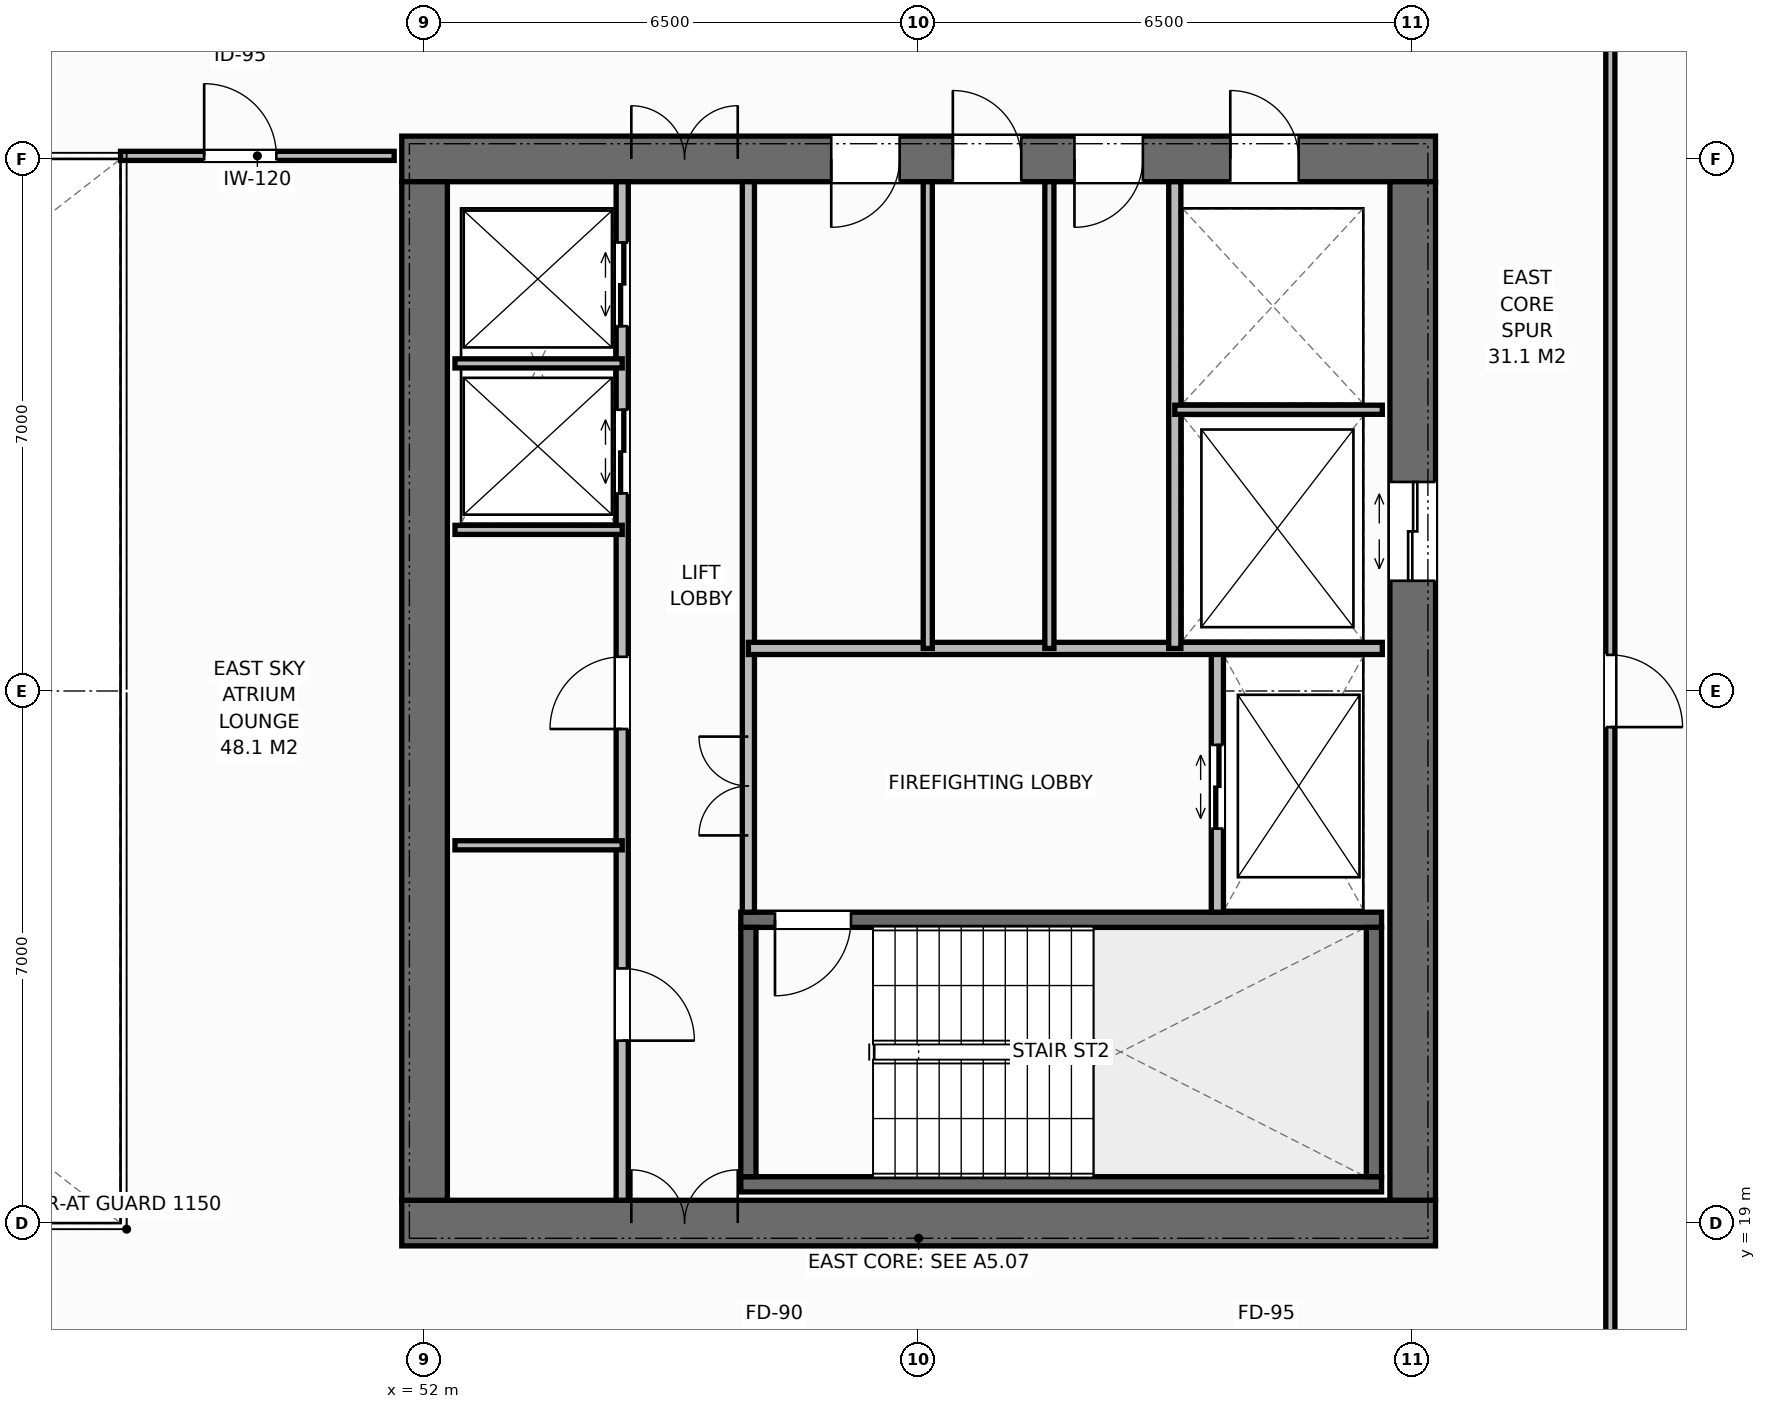
"""IFC4 building model, lengths in metres.
Left out: names, types, materials, properties, quantities, classifications, styles, units other than length and angle.
Written with IfcOpenShell. Run it as: python <this file> out.ifc"""

import sys

from ifc_helpers import new_model, si_unit, direction, frame, frame_2d, origin, place, context, subcontext, project, spatial, rectangle, extrude, element, fill, save


model = new_model("IFC4")
c1 = context("Model", 3, precision=1e-05, world=origin(), true_north=direction((0.0, 1.0)))
c2 = subcontext(c1, "Body", "Model", "MODEL_VIEW")
j1 = project(units=[si_unit("LENGTHUNIT", "METRE"), si_unit("PLANEANGLEUNIT", "RADIAN")], contexts=[c1])
p1 = place(None, origin())
s1 = spatial("IfcSite", under=j1, at=p1, CompositionType="ELEMENT")
p2 = place(p1, origin())
s2 = spatial("IfcBuilding", under=s1, at=p2, CompositionType="ELEMENT")
p3 = place(p2, frame((0.0, 0.0, 178.4)))
s3 = spatial("IfcBuildingStorey", under=s2, at=p3, CompositionType="ELEMENT", Elevation=178.4)
p4 = place(p3, frame((51.7, 19.0, 0.0), z_axis=(0.0, 0.0, 1.0), x_axis=(1.0, 0.0, 0.0)))
e1 = element("IfcWall", 1, at=p4, inside=s3, PredefinedType="SHEAR", context=c2, shape_type="SweptSolid", body=[
    extrude(rectangle(XDim=13.6, YDim=0.6, at=frame_2d((6.8, 0.0))), origin(), (0.0, 0.0, 1.0), 3.8),
])
p5 = place(p4, frame((3.02, 0.0, 0.0)))
e2 = element("IfcOpeningElement", 2, at=p5, cuts=e1, PredefinedType="OPENING", context=c2, shape_type="SweptSolid", body=[
    extrude(rectangle(XDim=1.4, YDim=2.2, at=frame_2d((0.7, 1.1))), frame((0.0, 0.31, 0.0), z_axis=(0.0, -1.0, 0.0), x_axis=(1.0, 0.0, 0.0)), (0.0, 0.0, 1.0), 0.62),
])
p6 = place(p3, frame((51.7, 33.0, 0.0), z_axis=(0.0, 0.0, 1.0), x_axis=(1.0, 0.0, 0.0)))
e3 = element("IfcWall", 3, at=p6, inside=s3, PredefinedType="SHEAR", context=c2, shape_type="SweptSolid", body=[
    extrude(rectangle(XDim=13.6, YDim=0.6, at=frame_2d((6.8, 0.0))), origin(), (0.0, 0.0, 1.0), 3.8),
])
p7 = place(p6, frame((3.02, 0.0, 0.0)))
e4 = element("IfcOpeningElement", 4, at=p7, cuts=e3, PredefinedType="OPENING", context=c2, shape_type="SweptSolid", body=[
    extrude(rectangle(XDim=1.4, YDim=2.2, at=frame_2d((0.7, 1.1))), frame((0.0, 0.31, 0.0), z_axis=(0.0, -1.0, 0.0), x_axis=(1.0, 0.0, 0.0)), (0.0, 0.0, 1.0), 0.62),
])
p8 = place(p6, frame((10.9, 0.0, 0.0)))
e5 = element("IfcOpeningElement", 5, at=p8, cuts=e3, PredefinedType="OPENING", context=c2, shape_type="SweptSolid", body=[
    extrude(rectangle(XDim=0.9, YDim=2.15, at=frame_2d((0.45, 1.075))), frame((0.0, 0.31, 0.0), z_axis=(0.0, -1.0, 0.0), x_axis=(1.0, 0.0, 0.0)), (0.0, 0.0, 1.0), 0.62),
])
p9 = place(p6, frame((5.65, 0.0, 0.0)))
e6 = element("IfcOpeningElement", 6, at=p9, cuts=e3, PredefinedType="OPENING", context=c2, shape_type="SweptSolid", body=[
    extrude(rectangle(XDim=0.9, YDim=2.15, at=frame_2d((0.45, 1.075))), frame((0.0, 0.31, 0.0), z_axis=(0.0, -1.0, 0.0), x_axis=(1.0, 0.0, 0.0)), (0.0, 0.0, 1.0), 0.62),
])
p10 = place(p6, frame((7.25, 0.0, 0.0)))
e7 = element("IfcOpeningElement", 7, at=p10, cuts=e3, PredefinedType="OPENING", context=c2, shape_type="SweptSolid", body=[
    extrude(rectangle(XDim=0.9, YDim=2.15, at=frame_2d((0.45, 1.075))), frame((0.0, 0.31, 0.0), z_axis=(0.0, -1.0, 0.0), x_axis=(1.0, 0.0, 0.0)), (0.0, 0.0, 1.0), 0.62),
])
p11 = place(p6, frame((8.85, 0.0, 0.0)))
e8 = element("IfcOpeningElement", 8, at=p11, cuts=e3, PredefinedType="OPENING", context=c2, shape_type="SweptSolid", body=[
    extrude(rectangle(XDim=0.9, YDim=2.15, at=frame_2d((0.45, 1.075))), frame((0.0, 0.31, 0.0), z_axis=(0.0, -1.0, 0.0), x_axis=(1.0, 0.0, 0.0)), (0.0, 0.0, 1.0), 0.62),
])
p12 = place(p3, frame((52.0, 19.3, 0.0), z_axis=(0.0, 0.0, 1.0), x_axis=(0.0, 1.0, 0.0)))
e9 = element("IfcWall", 9, at=p12, inside=s3, PredefinedType="SHEAR", context=c2, shape_type="SweptSolid", body=[
    extrude(rectangle(XDim=13.4, YDim=0.6, at=frame_2d((6.7, 0.0))), origin(), (0.0, 0.0, 1.0), 3.8),
])
p13 = place(p3, frame((65.0, 19.3, 0.0), z_axis=(0.0, 0.0, 1.0), x_axis=(0.0, 1.0, 0.0)))
e10 = element("IfcWall", 10, at=p13, inside=s3, PredefinedType="SHEAR", context=c2, shape_type="SweptSolid", body=[
    extrude(rectangle(XDim=13.4, YDim=0.6, at=frame_2d((6.7, 0.0))), origin(), (0.0, 0.0, 1.0), 3.8),
])
p14 = place(p13, frame((8.15, 0.0, 0.0)))
e11 = element("IfcOpeningElement", 11, at=p14, cuts=e10, PredefinedType="OPENING", context=c2, shape_type="SweptSolid", body=[
    extrude(rectangle(XDim=1.3, YDim=2.2, at=frame_2d((0.65, 1.1))), frame((0.0, 0.31, 0.0), z_axis=(0.0, -1.0, 0.0), x_axis=(1.0, 0.0, 0.0)), (0.0, 0.0, 1.0), 0.62),
])
p15 = place(p3, frame((56.16, 19.51, 0.0), z_axis=(0.0, 0.0, 1.0), x_axis=(1.0, 0.0, 0.0)))
e12 = element("IfcWall", 12, at=p15, inside=s3, PredefinedType="SHEAR", context=c2, shape_type="SweptSolid", body=[
    extrude(rectangle(XDim=8.43, YDim=0.2, at=frame_2d((4.215, 0.0))), origin(), (0.0, 0.0, 1.0), 3.8),
])
p16 = place(p3, frame((56.16, 22.99, 0.0), z_axis=(0.0, 0.0, 1.0), x_axis=(1.0, 0.0, 0.0)))
e13 = element("IfcWall", 13, at=p16, inside=s3, PredefinedType="SHEAR", context=c2, shape_type="SweptSolid", body=[
    extrude(rectangle(XDim=8.43, YDim=0.2, at=frame_2d((4.215, 0.0))), origin(), (0.0, 0.0, 1.0), 3.8),
])
p17 = place(p16, frame((0.45, 0.0, 0.0)))
e14 = element("IfcOpeningElement", 14, at=p17, cuts=e13, PredefinedType="OPENING", context=c2, shape_type="SweptSolid", body=[
    extrude(rectangle(XDim=1.0, YDim=2.15, at=frame_2d((0.5, 1.075))), frame((0.0, 0.11, 0.0), z_axis=(0.0, -1.0, 0.0), x_axis=(1.0, 0.0, 0.0)), (0.0, 0.0, 1.0), 0.22),
])
for number, where, z_axis, x_axis in (
    (15, (56.26, 19.61, 0.0), (0.0, 0.0, 1.0), (0.0, 1.0, 0.0)),
    (16, (64.49, 19.61, 0.0), (0.0, 0.0, 1.0), (0.0, 1.0, 0.0)),
):
    element("IfcWall", number, at=place(p3, frame(where, z_axis=z_axis, x_axis=x_axis)), inside=s3, PredefinedType="SHEAR", context=c2, shape_type="SweptSolid", body=[
        extrude(rectangle(XDim=3.28, YDim=0.2, at=frame_2d((1.64, 0.0))), origin(), (0.0, 0.0, 1.0), 3.8),
    ])
p18 = place(p3, frame((54.6, 19.3, 0.0), z_axis=(0.0, 0.0, 1.0), x_axis=(0.0, 1.0, 0.0)))
e17 = element("IfcWall", 17, at=p18, inside=s3, PredefinedType="STANDARD", context=c2, shape_type="SweptSolid", body=[
    extrude(rectangle(XDim=13.4, YDim=0.16, at=frame_2d((6.7, 0.0))), origin(), (0.0, 0.0, 1.0), 3.572),
])
p19 = place(p18, frame((2.1, 0.0, 0.0)))
e18 = element("IfcOpeningElement", 18, at=p19, cuts=e17, PredefinedType="OPENING", context=c2, shape_type="SweptSolid", body=[
    extrude(rectangle(XDim=0.95, YDim=2.15, at=frame_2d((0.475, 1.075))), frame((0.0, 0.09, 0.0), z_axis=(0.0, -1.0, 0.0), x_axis=(1.0, 0.0, 0.0)), (0.0, 0.0, 1.0), 0.18),
])
p20 = place(p18, frame((6.2, 0.0, 0.0)))
e19 = element("IfcOpeningElement", 19, at=p20, cuts=e17, PredefinedType="OPENING", context=c2, shape_type="SweptSolid", body=[
    extrude(rectangle(XDim=0.95, YDim=2.15, at=frame_2d((0.475, 1.075))), frame((0.0, 0.09, 0.0), z_axis=(0.0, -1.0, 0.0), x_axis=(1.0, 0.0, 0.0)), (0.0, 0.0, 1.0), 0.18),
])
p21 = place(p18, frame((9.3, 0.0, 0.0)))
e20 = element("IfcOpeningElement", 20, at=p21, cuts=e17, PredefinedType="OPENING", context=c2, shape_type="SweptSolid", body=[
    extrude(rectangle(XDim=1.1, YDim=2.2, at=frame_2d((0.55, 1.1))), frame((0.0, 0.09, 0.0), z_axis=(0.0, -1.0, 0.0), x_axis=(1.0, 0.0, 0.0)), (0.0, 0.0, 1.0), 0.18),
])
p22 = place(p18, frame((11.5, 0.0, 0.0)))
e21 = element("IfcOpeningElement", 21, at=p22, cuts=e17, PredefinedType="OPENING", context=c2, shape_type="SweptSolid", body=[
    extrude(rectangle(XDim=1.1, YDim=2.2, at=frame_2d((0.55, 1.1))), frame((0.0, 0.09, 0.0), z_axis=(0.0, -1.0, 0.0), x_axis=(1.0, 0.0, 0.0)), (0.0, 0.0, 1.0), 0.18),
])
p23 = place(p3, frame((56.26, 23.09, 0.0), z_axis=(0.0, 0.0, 1.0), x_axis=(0.0, 1.0, 0.0)))
e22 = element("IfcWall", 22, at=p23, inside=s3, PredefinedType="STANDARD", context=c2, shape_type="SweptSolid", body=[
    extrude(rectangle(XDim=9.61, YDim=0.16, at=frame_2d((4.805, 0.0))), origin(), (0.0, 0.0, 1.0), 3.572),
])
p24 = place(p23, frame((1.01, 0.0, 0.0)))
e23 = element("IfcOpeningElement", 23, at=p24, cuts=e22, PredefinedType="OPENING", context=c2, shape_type="SweptSolid", body=[
    extrude(rectangle(XDim=1.3, YDim=2.2, at=frame_2d((0.65, 1.1))), frame((0.0, 0.09, 0.0), z_axis=(0.0, -1.0, 0.0), x_axis=(1.0, 0.0, 0.0)), (0.0, 0.0, 1.0), 0.18),
])
for number, where, z_axis, x_axis in (
    (24, (52.4, 23.97, 0.0), (0.0, 0.0, 1.0), (1.0, 0.0, 0.0)),
    (25, (52.4, 28.12, 0.0), (0.0, 0.0, 1.0), (1.0, 0.0, 0.0)),
    (26, (52.4, 30.31, 0.0), (0.0, 0.0, 1.0), (1.0, 0.0, 0.0)),
):
    element("IfcWall", number, at=place(p3, frame(where, z_axis=z_axis, x_axis=x_axis)), inside=s3, PredefinedType="PARTITIONING", context=c2, shape_type="SweptSolid", body=[
        extrude(rectangle(XDim=2.2, YDim=0.12, at=frame_2d((1.1, 0.0))), origin(), (0.0, 0.0, 1.0), 3.572),
    ])
p25 = place(p3, frame((62.43, 23.09, 0.0), z_axis=(0.0, 0.0, 1.0), x_axis=(0.0, 1.0, 0.0)))
e27 = element("IfcWall", 27, at=p25, inside=s3, PredefinedType="STANDARD", context=c2, shape_type="SweptSolid", body=[
    extrude(rectangle(XDim=3.47, YDim=0.16, at=frame_2d((1.735, 0.0))), origin(), (0.0, 0.0, 1.0), 3.572),
])
p26 = place(p25, frame((1.1, 0.0, 0.0)))
e28 = element("IfcOpeningElement", 28, at=p26, cuts=e27, PredefinedType="OPENING", context=c2, shape_type="SweptSolid", body=[
    extrude(rectangle(XDim=1.1, YDim=2.2, at=frame_2d((0.55, 1.1))), frame((0.0, 0.09, 0.0), z_axis=(0.0, -1.0, 0.0), x_axis=(1.0, 0.0, 0.0)), (0.0, 0.0, 1.0), 0.18),
])
p27 = place(p3, frame((56.26, 26.56, 0.0), z_axis=(0.0, 0.0, 1.0), x_axis=(1.0, 0.0, 0.0)))
e29 = element("IfcWall", 29, at=p27, inside=s3, PredefinedType="STANDARD", context=c2, shape_type="SweptSolid", body=[
    extrude(rectangle(XDim=8.34, YDim=0.16, at=frame_2d((4.17, 0.0))), origin(), (0.0, 0.0, 1.0), 3.572),
])
p28 = place(p3, frame((61.87, 26.56, 0.0), z_axis=(0.0, 0.0, 1.0), x_axis=(0.0, 1.0, 0.0)))
e30 = element("IfcWall", 30, at=p28, inside=s3, PredefinedType="STANDARD", context=c2, shape_type="SweptSolid", body=[
    extrude(rectangle(XDim=6.14, YDim=0.16, at=frame_2d((3.07, 0.0))), origin(), (0.0, 0.0, 1.0), 3.572),
])
p29 = place(p3, frame((61.87, 29.7, 0.0), z_axis=(0.0, 0.0, 1.0), x_axis=(1.0, 0.0, 0.0)))
e31 = element("IfcWall", 31, at=p29, inside=s3, PredefinedType="PARTITIONING", context=c2, shape_type="SweptSolid", body=[
    extrude(rectangle(XDim=2.73, YDim=0.12, at=frame_2d((1.365, 0.0))), origin(), (0.0, 0.0, 1.0), 3.572),
])
for number, where, z_axis, x_axis in (
    (32, (58.62, 26.56, 0.0), (0.0, 0.0, 1.0), (0.0, 1.0, 0.0)),
    (33, (60.22, 26.56, 0.0), (0.0, 0.0, 1.0), (0.0, 1.0, 0.0)),
):
    element("IfcWall", number, at=place(p3, frame(where, z_axis=z_axis, x_axis=x_axis)), inside=s3, PredefinedType="PARTITIONING", context=c2, shape_type="SweptSolid", body=[
        extrude(rectangle(XDim=6.14, YDim=0.12, at=frame_2d((3.07, 0.0))), origin(), (0.0, 0.0, 1.0), 3.572),
    ])
p30 = place(p3, frame((48.0, 33.04, 0.0), z_axis=(0.0, 0.0, 1.0), x_axis=(1.0, 0.0, 0.0)))
e34 = element("IfcWall", 34, at=p30, inside=s3, PredefinedType="PARTITIONING", context=c2, shape_type="SweptSolid", body=[
    extrude(rectangle(XDim=3.6, YDim=0.12, at=frame_2d((1.8, 0.0))), origin(), (0.0, 0.0, 1.0), 3.312),
])
p31 = place(p30, frame((1.1, 0.0, 0.0)))
e35 = element("IfcOpeningElement", 35, at=p31, cuts=e34, PredefinedType="OPENING", context=c2, shape_type="SweptSolid", body=[
    extrude(rectangle(XDim=0.95, YDim=2.15, at=frame_2d((0.475, 1.075))), frame((0.0, 0.07, 0.0), z_axis=(0.0, -1.0, 0.0), x_axis=(1.0, 0.0, 0.0)), (0.0, 0.0, 1.0), 0.14),
])
p32 = place(p3, frame((67.6, 16.5, 0.0), z_axis=(0.0, 0.0, 1.0), x_axis=(0.0, 1.0, 0.0)))
e36 = element("IfcWall", 36, at=p32, inside=s3, PredefinedType="PARTITIONING", context=c2, shape_type="SweptSolid", body=[
    extrude(rectangle(XDim=19.0, YDim=0.12, at=frame_2d((9.5, 0.0))), origin(), (0.0, 0.0, 1.0), 3.572),
])
p33 = place(p32, frame((9.025, 0.0, 0.0)))
e37 = element("IfcOpeningElement", 37, at=p33, cuts=e36, PredefinedType="OPENING", context=c2, shape_type="SweptSolid", body=[
    extrude(rectangle(XDim=0.95, YDim=2.15, at=frame_2d((0.475, 1.075))), frame((0.0, 0.07, 0.0), z_axis=(0.0, -1.0, 0.0), x_axis=(1.0, 0.0, 0.0)), (0.0, 0.0, 1.0), 0.14),
])
p34 = place(p5, origin())
e38 = element("IfcDoor", 38, at=p34, inside=s3, OperationType="DOUBLE_DOOR_SINGLE_SWING", PredefinedType="DOOR", context=c2, shape_type="SweptSolid", body=[
    extrude(rectangle(XDim=1.4, YDim=2.2, at=frame_2d((0.7, 1.1))), frame((0.0, 0.075, 0.0), z_axis=(0.0, -1.0, 0.0), x_axis=(1.0, 0.0, 0.0)), (0.0, 0.0, 1.0), 0.05),
])
fill(e2, e38)
p35 = place(p7, origin())
e39 = element("IfcDoor", 39, at=p35, inside=s3, OperationType="DOUBLE_DOOR_SINGLE_SWING", PredefinedType="DOOR", context=c2, shape_type="SweptSolid", body=[
    extrude(rectangle(XDim=1.4, YDim=2.2, at=frame_2d((0.7, 1.1))), frame((0.0, -0.025, 0.0), z_axis=(0.0, -1.0, 0.0), x_axis=(1.0, 0.0, 0.0)), (0.0, 0.0, 1.0), 0.05),
])
fill(e4, e39)
p36 = place(p19, origin())
e40 = element("IfcDoor", 40, at=p36, inside=s3, OperationType="SINGLE_SWING_RIGHT", PredefinedType="DOOR", context=c2, shape_type="SweptSolid", body=[
    extrude(rectangle(XDim=0.95, YDim=2.15, at=frame_2d((0.475, 1.075))), frame((0.0, 0.025, 0.0), z_axis=(0.0, -1.0, 0.0), x_axis=(1.0, 0.0, 0.0)), (0.0, 0.0, 1.0), 0.05),
])
fill(e18, e40)
p37 = place(p20, origin())
e41 = element("IfcDoor", 41, at=p37, inside=s3, OperationType="SINGLE_SWING_LEFT", PredefinedType="DOOR", context=c2, shape_type="SweptSolid", body=[
    extrude(rectangle(XDim=0.95, YDim=2.15, at=frame_2d((0.475, 1.075))), frame((0.0, 0.025, 0.0), z_axis=(0.0, -1.0, 0.0), x_axis=(1.0, 0.0, 0.0)), (0.0, 0.0, 1.0), 0.05),
])
fill(e19, e41)
p38 = place(p21, origin())
e42 = element("IfcDoor", 42, at=p38, inside=s3, OperationType="DOUBLE_DOOR_SLIDING", PredefinedType="DOOR", context=c2, shape_type="SweptSolid", body=[
    extrude(rectangle(XDim=1.1, YDim=2.2, at=frame_2d((0.55, 1.1))), frame((0.0, 0.025, 0.0), z_axis=(0.0, -1.0, 0.0), x_axis=(1.0, 0.0, 0.0)), (0.0, 0.0, 1.0), 0.05),
])
fill(e20, e42)
p39 = place(p22, origin())
e43 = element("IfcDoor", 43, at=p39, inside=s3, OperationType="DOUBLE_DOOR_SLIDING", PredefinedType="DOOR", context=c2, shape_type="SweptSolid", body=[
    extrude(rectangle(XDim=1.1, YDim=2.2, at=frame_2d((0.55, 1.1))), frame((0.0, 0.025, 0.0), z_axis=(0.0, -1.0, 0.0), x_axis=(1.0, 0.0, 0.0)), (0.0, 0.0, 1.0), 0.05),
])
fill(e21, e43)
p40 = place(p17, origin())
e44 = element("IfcDoor", 44, at=p40, inside=s3, OperationType="SINGLE_SWING_RIGHT", PredefinedType="DOOR", context=c2, shape_type="SweptSolid", body=[
    extrude(rectangle(XDim=1.0, YDim=2.15, at=frame_2d((0.5, 1.075))), frame((0.0, 0.025, 0.0), z_axis=(0.0, -1.0, 0.0), x_axis=(1.0, 0.0, 0.0)), (0.0, 0.0, 1.0), 0.05),
])
fill(e14, e44)
p41 = place(p26, origin())
e45 = element("IfcDoor", 45, at=p41, inside=s3, OperationType="DOUBLE_DOOR_SLIDING", PredefinedType="DOOR", context=c2, shape_type="SweptSolid", body=[
    extrude(rectangle(XDim=1.1, YDim=2.2, at=frame_2d((0.55, 1.1))), frame((0.0, 0.025, 0.0), z_axis=(0.0, -1.0, 0.0), x_axis=(1.0, 0.0, 0.0)), (0.0, 0.0, 1.0), 0.05),
])
fill(e28, e45)
p42 = place(p24, origin())
e46 = element("IfcDoor", 46, at=p42, inside=s3, OperationType="DOUBLE_DOOR_SINGLE_SWING", PredefinedType="DOOR", context=c2, shape_type="SweptSolid", body=[
    extrude(rectangle(XDim=1.3, YDim=2.2, at=frame_2d((0.65, 1.1))), frame((0.0, 0.025, 0.0), z_axis=(0.0, -1.0, 0.0), x_axis=(1.0, 0.0, 0.0)), (0.0, 0.0, 1.0), 0.05),
])
fill(e23, e46)
p43 = place(p14, origin())
e47 = element("IfcDoor", 47, at=p43, inside=s3, OperationType="DOUBLE_DOOR_SLIDING", PredefinedType="DOOR", context=c2, shape_type="SweptSolid", body=[
    extrude(rectangle(XDim=1.3, YDim=2.2, at=frame_2d((0.65, 1.1))), frame((0.0, 0.025, 0.0), z_axis=(0.0, -1.0, 0.0), x_axis=(1.0, 0.0, 0.0)), (0.0, 0.0, 1.0), 0.05),
])
fill(e11, e47)
p44 = place(p8, origin())
e48 = element("IfcDoor", 48, at=p44, inside=s3, OperationType="SINGLE_SWING_LEFT", PredefinedType="DOOR", context=c2, shape_type="SweptSolid", body=[
    extrude(rectangle(XDim=0.9, YDim=2.15, at=frame_2d((0.45, 1.075))), frame((0.0, -0.025, 0.0), z_axis=(0.0, -1.0, 0.0), x_axis=(1.0, 0.0, 0.0)), (0.0, 0.0, 1.0), 0.05),
])
fill(e5, e48)
p45 = place(p9, origin())
e49 = element("IfcDoor", 49, at=p45, inside=s3, OperationType="SINGLE_SWING_RIGHT", PredefinedType="DOOR", context=c2, shape_type="SweptSolid", body=[
    extrude(rectangle(XDim=0.9, YDim=2.15, at=frame_2d((0.45, 1.075))), frame((0.0, -0.025, 0.0), z_axis=(0.0, -1.0, 0.0), x_axis=(1.0, 0.0, 0.0)), (0.0, 0.0, 1.0), 0.05),
])
fill(e6, e49)
p46 = place(p10, origin())
e50 = element("IfcDoor", 50, at=p46, inside=s3, OperationType="SINGLE_SWING_LEFT", PredefinedType="DOOR", context=c2, shape_type="SweptSolid", body=[
    extrude(rectangle(XDim=0.9, YDim=2.15, at=frame_2d((0.45, 1.075))), frame((0.0, -0.025, 0.0), z_axis=(0.0, -1.0, 0.0), x_axis=(1.0, 0.0, 0.0)), (0.0, 0.0, 1.0), 0.05),
])
fill(e7, e50)
p47 = place(p11, origin())
e51 = element("IfcDoor", 51, at=p47, inside=s3, OperationType="SINGLE_SWING_RIGHT", PredefinedType="DOOR", context=c2, shape_type="SweptSolid", body=[
    extrude(rectangle(XDim=0.9, YDim=2.15, at=frame_2d((0.45, 1.075))), frame((0.0, -0.025, 0.0), z_axis=(0.0, -1.0, 0.0), x_axis=(1.0, 0.0, 0.0)), (0.0, 0.0, 1.0), 0.05),
])
fill(e8, e51)
p48 = place(p31, origin())
e52 = element("IfcDoor", 52, at=p48, inside=s3, OperationType="SINGLE_SWING_LEFT", PredefinedType="DOOR", context=c2, shape_type="SweptSolid", body=[
    extrude(rectangle(XDim=0.95, YDim=2.15, at=frame_2d((0.475, 1.075))), frame((0.0, 0.025, 0.0), z_axis=(0.0, -1.0, 0.0), x_axis=(1.0, 0.0, 0.0)), (0.0, 0.0, 1.0), 0.05),
])
fill(e35, e52)
p49 = place(p33, origin())
e53 = element("IfcDoor", 53, at=p49, inside=s3, OperationType="SINGLE_SWING_RIGHT", PredefinedType="DOOR", context=c2, shape_type="SweptSolid", body=[
    extrude(rectangle(XDim=0.95, YDim=2.15, at=frame_2d((0.475, 1.075))), frame((0.0, 0.025, 0.0), z_axis=(0.0, -1.0, 0.0), x_axis=(1.0, 0.0, 0.0)), (0.0, 0.0, 1.0), 0.05),
])
fill(e37, e53)
save(model, sys.argv[1])
